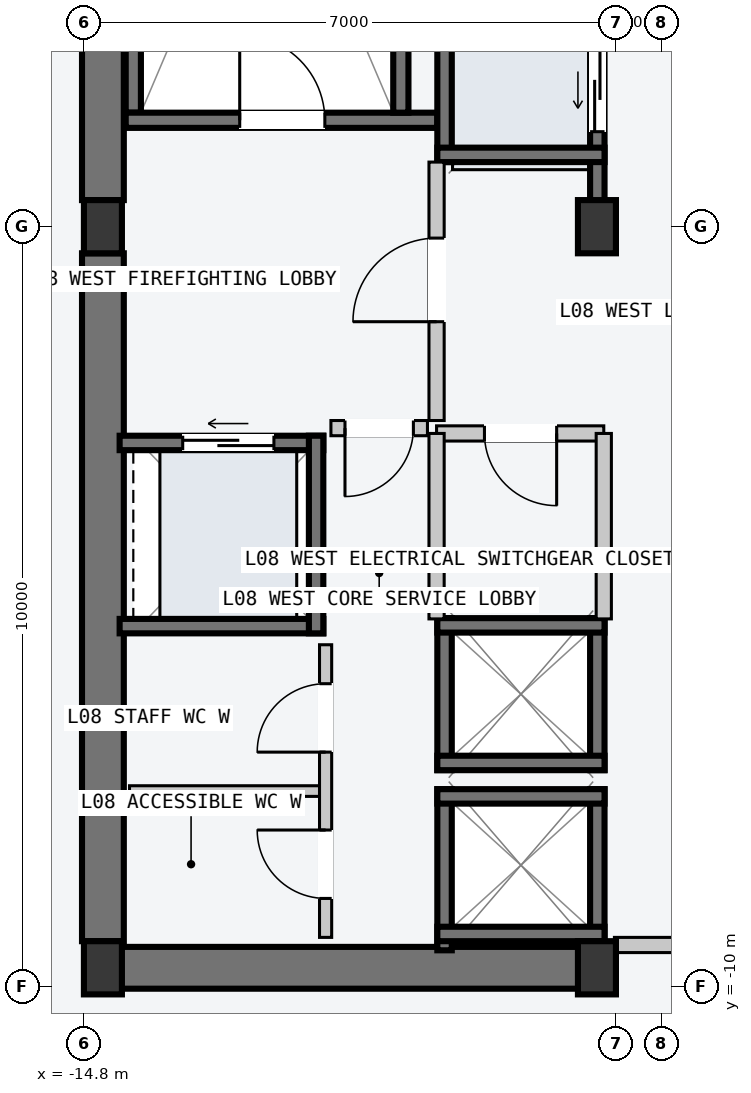
"""IFC4 building model, lengths in metres.
Left out: names, types, materials, properties, quantities, classifications, styles, units other than length and angle.
Written with IfcOpenShell. Run it as: python <this file> out.ifc"""

import sys

from ifc_helpers import new_model, si_unit, direction, frame, frame_2d, origin, origin_2d, place, context, subcontext, project, spatial, rectangle, i_section, extrude, element, fill, save


model = new_model("IFC4")
c1 = context("Model", 3, precision=1e-05, world=origin(), true_north=direction((0.0, 1.0)))
c2 = subcontext(c1, "Body", "Model", "MODEL_VIEW")
j1 = project(units=[si_unit("LENGTHUNIT", "METRE"), si_unit("PLANEANGLEUNIT", "RADIAN")], contexts=[c1])
p1 = place(None, origin())
s1 = spatial("IfcSite", under=j1, at=p1, CompositionType="ELEMENT")
p2 = place(p1, origin())
s2 = spatial("IfcBuilding", under=s1, at=p2, CompositionType="ELEMENT")
p3 = place(p2, frame((0.0, 0.0, 34.8)))
s3 = spatial("IfcBuildingStorey", under=s2, at=p3, CompositionType="ELEMENT", Elevation=34.8)
p4 = place(p3, frame((-14.53, -9.75, -0.2), z_axis=(0.0, 0.0, 1.0), x_axis=(1.0, 0.0, 0.0)))
e1 = element("IfcWall", 1, at=p4, inside=s3, PredefinedType="SHEAR", context=c2, shape_type="SweptSolid", body=[
    extrude(rectangle(XDim=6.46, YDim=0.55, at=frame_2d((3.23, 0.0))), origin(), (0.0, 0.0, 1.0), 3.6),
])
for number, where, z_axis, x_axis in (
    (2, (-14.55, -9.4, -0.2), (0.0, 0.0, 1.0), (0.0, 1.0, 0.0)),
    (3, (-14.55, 0.35, -0.2), (0.0, 0.0, 1.0), (0.0, 1.0, 0.0)),
):
    element("IfcWall", number, at=place(p3, frame(where, z_axis=z_axis, x_axis=x_axis)), inside=s3, PredefinedType="SHEAR", context=c2, shape_type="SweptSolid", body=[
        extrude(rectangle(XDim=9.05, YDim=0.55, at=frame_2d((4.525, 0.0))), origin(), (0.0, 0.0, 1.0), 3.6),
    ])
p5 = place(p3, frame((-14.15, 1.5, -0.2), z_axis=(0.0, 0.0, 1.0), x_axis=(0.0, 1.0, 0.0)))
e4 = element("IfcWall", 4, at=p5, inside=s3, PredefinedType="SOLIDWALL", context=c2, shape_type="SweptSolid", body=[
    extrude(rectangle(XDim=7.8, YDim=0.2, at=frame_2d((3.9, 0.0))), origin(), (0.0, 0.0, 1.0), 3.6),
])
p6 = place(p3, frame((-14.25, 1.4, -0.2), z_axis=(0.0, 0.0, 1.0), x_axis=(1.0, 0.0, 0.0)))
e5 = element("IfcWall", 5, at=p6, inside=s3, PredefinedType="SOLIDWALL", context=c2, shape_type="SweptSolid", body=[
    extrude(rectangle(XDim=4.1, YDim=0.2, at=frame_2d((2.05, 0.0))), origin(), (0.0, 0.0, 1.0), 3.6),
])
p7 = place(p6, frame((1.5, 0.0, 0.2)))
e6 = element("IfcOpeningElement", 6, at=p7, cuts=e5, PredefinedType="OPENING", context=c2, shape_type="SweptSolid", body=[
    extrude(rectangle(XDim=1.12, YDim=2.18, at=frame_2d((0.56, 1.09))), frame((0.0, 0.11, 0.0), z_axis=(0.0, -1.0, 0.0), x_axis=(1.0, 0.0, 0.0)), (0.0, 0.0, 1.0), 0.22),
])
p8 = place(p3, frame((-10.63, 1.5, -0.2), z_axis=(0.0, 0.0, 1.0), x_axis=(0.0, 1.0, 0.0)))
e7 = element("IfcWall", 7, at=p8, inside=s3, PredefinedType="SOLIDWALL", context=c2, shape_type="SweptSolid", body=[
    extrude(rectangle(XDim=7.8, YDim=0.2, at=frame_2d((3.9, 0.0))), origin(), (0.0, 0.0, 1.0), 3.6),
])
for number, where, z_axis, x_axis in (
    (8, (-14.55, -9.75, 0.0), (0.0, 0.0, 1.0), (1.0, 0.0, 0.0)),
    (9, (-14.55, 0.0, 0.0), (0.0, 0.0, 1.0), (1.0, 0.0, 0.0)),
    (10, (-8.05, -9.75, 0.0), (0.0, 0.0, 1.0), (1.0, 0.0, 0.0)),
    (11, (-8.05, 0.0, 0.0), (0.0, 0.0, 1.0), (1.0, 0.0, 0.0)),
):
    element("IfcColumn", number, at=place(p3, frame(where, z_axis=z_axis, x_axis=x_axis)), inside=s3, PredefinedType="COLUMN", context=c2, shape_type="SweptSolid", body=[
        extrude(i_section(OverallWidth=0.5, OverallDepth=0.7, WebThickness=0.028, FlangeThickness=0.045, at=origin_2d()), origin(), (0.0, 0.0, 1.0), 3.6),
    ])
p9 = place(p3, frame((-8.045, 0.21, -0.2), z_axis=(0.0, 0.0, 1.0), x_axis=(0.0, 1.0, 0.0)))
e12 = element("IfcWall", 12, at=p9, inside=s3, PredefinedType="SOLIDWALL", context=c2, shape_type="SweptSolid", body=[
    extrude(rectangle(XDim=2.54, YDim=0.19, at=frame_2d((1.27, 0.0))), origin(), (0.0, 0.0, 1.0), 3.6),
])
p10 = place(p9, frame((1.04, 0.0, 0.2)))
e13 = element("IfcOpeningElement", 13, at=p10, cuts=e12, PredefinedType="OPENING", context=c2, shape_type="SweptSolid", body=[
    extrude(rectangle(XDim=1.1, YDim=2.2, at=frame_2d((0.55, 1.1))), frame((0.0, 0.105, 0.0), z_axis=(0.0, -1.0, 0.0), x_axis=(1.0, 0.0, 0.0)), (0.0, 0.0, 1.0), 0.21),
])
p11 = place(p3, frame((-10.055, 0.85, -0.2), z_axis=(0.0, 0.0, 1.0), x_axis=(0.0, 1.0, 0.0)))
e14 = element("IfcWall", 14, at=p11, inside=s3, PredefinedType="SOLIDWALL", context=c2, shape_type="SweptSolid", body=[
    extrude(rectangle(XDim=1.9, YDim=0.19, at=frame_2d((0.95, 0.0))), origin(), (0.0, 0.0, 1.0), 3.6),
])
p12 = place(p3, frame((-10.15, 0.945, -0.2), z_axis=(0.0, 0.0, 1.0), x_axis=(1.0, 0.0, 0.0)))
e15 = element("IfcWall", 15, at=p12, inside=s3, PredefinedType="SOLIDWALL", context=c2, shape_type="SweptSolid", body=[
    extrude(rectangle(XDim=2.2, YDim=0.19, at=frame_2d((1.1, 0.0))), origin(), (0.0, 0.0, 1.0), 3.6),
])
for number, where, z_axis, x_axis in (
    (16, (-8.045, -9.52, -0.2), (0.0, 0.0, 1.0), (0.0, 1.0, 0.0)),
    (17, (-10.055, -9.52, -0.2), (0.0, 0.0, 1.0), (0.0, 1.0, 0.0)),
):
    element("IfcWall", number, at=place(p3, frame(where, z_axis=z_axis, x_axis=x_axis)), inside=s3, PredefinedType="SOLIDWALL", context=c2, shape_type="SweptSolid", body=[
        extrude(rectangle(XDim=2.12, YDim=0.19, at=frame_2d((1.06, 0.0))), origin(), (0.0, 0.0, 1.0), 3.6),
    ])
for number, where, z_axis, x_axis in (
    (18, (-10.15, -7.495, -0.2), (0.0, 0.0, 1.0), (1.0, 0.0, 0.0)),
    (19, (-10.15, -9.305, -0.2), (0.0, 0.0, 1.0), (1.0, 0.0, 0.0)),
):
    element("IfcWall", number, at=place(p3, frame(where, z_axis=z_axis, x_axis=x_axis)), inside=s3, PredefinedType="SOLIDWALL", context=c2, shape_type="SweptSolid", body=[
        extrude(rectangle(XDim=2.2, YDim=0.19, at=frame_2d((1.1, 0.0))), origin(), (0.0, 0.0, 1.0), 3.6),
    ])
for number, where, z_axis, x_axis in (
    (20, (-8.045, -7.15, -0.2), (0.0, 0.0, 1.0), (0.0, 1.0, 0.0)),
    (21, (-10.055, -7.15, -0.2), (0.0, 0.0, 1.0), (0.0, 1.0, 0.0)),
):
    element("IfcWall", number, at=place(p3, frame(where, z_axis=z_axis, x_axis=x_axis)), inside=s3, PredefinedType="SOLIDWALL", context=c2, shape_type="SweptSolid", body=[
        extrude(rectangle(XDim=2.0, YDim=0.19, at=frame_2d((1.0, 0.0))), origin(), (0.0, 0.0, 1.0), 3.6),
    ])
for number, where, z_axis, x_axis in (
    (22, (-10.15, -5.245, -0.2), (0.0, 0.0, 1.0), (1.0, 0.0, 0.0)),
    (23, (-10.15, -7.055, -0.2), (0.0, 0.0, 1.0), (1.0, 0.0, 0.0)),
):
    element("IfcWall", number, at=place(p3, frame(where, z_axis=z_axis, x_axis=x_axis)), inside=s3, PredefinedType="SOLIDWALL", context=c2, shape_type="SweptSolid", body=[
        extrude(rectangle(XDim=2.2, YDim=0.19, at=frame_2d((1.1, 0.0))), origin(), (0.0, 0.0, 1.0), 3.6),
    ])
p13 = place(p3, frame((-14.33, -2.845, -0.2), z_axis=(0.0, 0.0, 1.0), x_axis=(1.0, 0.0, 0.0)))
e24 = element("IfcWall", 24, at=p13, inside=s3, PredefinedType="SOLIDWALL", context=c2, shape_type="SweptSolid", body=[
    extrude(rectangle(XDim=2.68, YDim=0.19, at=frame_2d((1.34, 0.0))), origin(), (0.0, 0.0, 1.0), 3.6),
])
p14 = place(p13, frame((0.83, 0.0, 0.2)))
e25 = element("IfcOpeningElement", 25, at=p14, cuts=e24, PredefinedType="OPENING", context=c2, shape_type="SweptSolid", body=[
    extrude(rectangle(XDim=1.2, YDim=2.2, at=frame_2d((0.6, 1.1))), frame((0.0, 0.105, 0.0), z_axis=(0.0, -1.0, 0.0), x_axis=(1.0, 0.0, 0.0)), (0.0, 0.0, 1.0), 0.21),
])
p15 = place(p3, frame((-14.33, -5.255, -0.2), z_axis=(0.0, 0.0, 1.0), x_axis=(1.0, 0.0, 0.0)))
e26 = element("IfcWall", 26, at=p15, inside=s3, PredefinedType="SOLIDWALL", context=c2, shape_type="SweptSolid", body=[
    extrude(rectangle(XDim=2.68, YDim=0.19, at=frame_2d((1.34, 0.0))), origin(), (0.0, 0.0, 1.0), 3.6),
])
p16 = place(p3, frame((-11.745, -5.35, -0.2), z_axis=(0.0, 0.0, 1.0), x_axis=(0.0, 1.0, 0.0)))
e27 = element("IfcWall", 27, at=p16, inside=s3, PredefinedType="SOLIDWALL", context=c2, shape_type="SweptSolid", body=[
    extrude(rectangle(XDim=2.6, YDim=0.19, at=frame_2d((1.3, 0.0))), origin(), (0.0, 0.0, 1.0), 3.6),
])
p17 = place(p3, frame((-6.02, -9.45, 0.0), z_axis=(0.0, 0.0, 1.0), x_axis=(-1.0, 0.0, 0.0)))
e28 = element("IfcWall", 28, at=p17, inside=s3, PredefinedType="PARTITIONING", context=c2, shape_type="SweptSolid", body=[
    extrude(rectangle(XDim=1.8, YDim=0.2, at=frame_2d((0.9, 0.0))), origin(), (0.0, 0.0, 1.0), 3.4),
])
p18 = place(p3, frame((-10.16, -2.55, 0.0), z_axis=(0.0, 0.0, 1.0), x_axis=(0.0, 1.0, 0.0)))
e29 = element("IfcWall", 29, at=p18, inside=s3, PredefinedType="PARTITIONING", context=c2, shape_type="SweptSolid", body=[
    extrude(rectangle(XDim=3.4, YDim=0.2, at=frame_2d((1.7, 0.0))), origin(), (0.0, 0.0, 1.0), 3.4),
])
p19 = place(p18, frame((1.3, 0.0, 0.0)))
e30 = element("IfcOpeningElement", 30, at=p19, cuts=e29, PredefinedType="OPENING", context=c2, shape_type="SweptSolid", body=[
    extrude(rectangle(XDim=1.1, YDim=2.15, at=frame_2d((0.55, 1.075))), frame((0.0, 0.11, 0.0), z_axis=(0.0, -1.0, 0.0), x_axis=(1.0, 0.0, 0.0)), (0.0, 0.0, 1.0), 0.22),
])
p20 = place(p3, frame((-10.28, -2.65, 0.0), z_axis=(0.0, 0.0, 1.0), x_axis=(-1.0, 0.0, 0.0)))
e31 = element("IfcWall", 31, at=p20, inside=s3, PredefinedType="PARTITIONING", context=c2, shape_type="SweptSolid", body=[
    extrude(rectangle(XDim=1.27, YDim=0.2, at=frame_2d((0.635, 0.0))), origin(), (0.0, 0.0, 1.0), 3.4),
])
p21 = place(p20, frame((0.185, 0.0, 0.0)))
e32 = element("IfcOpeningElement", 32, at=p21, cuts=e31, PredefinedType="OPENING", context=c2, shape_type="SweptSolid", body=[
    extrude(rectangle(XDim=0.9, YDim=2.15, at=frame_2d((0.45, 1.075))), frame((0.0, 0.11, 0.0), z_axis=(0.0, -1.0, 0.0), x_axis=(1.0, 0.0, 0.0)), (0.0, 0.0, 1.0), 0.22),
])
p22 = place(p3, frame((-7.96, -2.72, 0.0), z_axis=(0.0, 0.0, 1.0), x_axis=(-1.0, 0.0, 0.0)))
e33 = element("IfcWall", 33, at=p22, inside=s3, PredefinedType="PARTITIONING", context=c2, shape_type="SweptSolid", body=[
    extrude(rectangle(XDim=2.2, YDim=0.2, at=frame_2d((1.1, 0.0))), origin(), (0.0, 0.0, 1.0), 3.4),
])
p23 = place(p22, frame((0.62, 0.0, 0.0)))
e34 = element("IfcOpeningElement", 34, at=p23, cuts=e33, PredefinedType="OPENING", context=c2, shape_type="SweptSolid", body=[
    extrude(rectangle(XDim=0.95, YDim=2.1, at=frame_2d((0.475, 1.05))), frame((0.0, 0.11, 0.0), z_axis=(0.0, -1.0, 0.0), x_axis=(1.0, 0.0, 0.0)), (0.0, 0.0, 1.0), 0.22),
])
for number, where, z_axis, x_axis in (
    (35, (-7.96, -5.16, 0.0), (0.0, 0.0, 1.0), (0.0, 1.0, 0.0)),
    (36, (-10.16, -5.16, 0.0), (0.0, 0.0, 1.0), (0.0, 1.0, 0.0)),
):
    element("IfcWall", number, at=place(p3, frame(where, z_axis=z_axis, x_axis=x_axis)), inside=s3, PredefinedType="PARTITIONING", context=c2, shape_type="SweptSolid", body=[
        extrude(rectangle(XDim=2.44, YDim=0.2, at=frame_2d((1.22, 0.0))), origin(), (0.0, 0.0, 1.0), 3.4),
    ])
p24 = place(p3, frame((-11.7, -7.425, 0.0), z_axis=(0.0, 0.0, 1.0), x_axis=(-1.0, 0.0, 0.0)))
e37 = element("IfcWall", 37, at=p24, inside=s3, PredefinedType="PARTITIONING", context=c2, shape_type="SweptSolid", body=[
    extrude(rectangle(XDim=2.5, YDim=0.14, at=frame_2d((1.25, 0.0))), origin(), (0.0, 0.0, 1.0), 3.4),
])
p25 = place(p3, frame((-11.62, -9.35, 0.0), z_axis=(0.0, 0.0, 1.0), x_axis=(0.0, 1.0, 0.0)))
e38 = element("IfcWall", 38, at=p25, inside=s3, PredefinedType="PARTITIONING", context=c2, shape_type="SweptSolid", body=[
    extrude(rectangle(XDim=3.85, YDim=0.16, at=frame_2d((1.925, 0.0))), origin(), (0.0, 0.0, 1.0), 3.4),
])
p26 = place(p25, frame((0.512, 0.0, 0.0)))
e39 = element("IfcOpeningElement", 39, at=p26, cuts=e38, PredefinedType="OPENING", context=c2, shape_type="SweptSolid", body=[
    extrude(rectangle(XDim=0.9, YDim=2.15, at=frame_2d((0.45, 1.075))), frame((0.0, 0.09, 0.0), z_axis=(0.0, -1.0, 0.0), x_axis=(1.0, 0.0, 0.0)), (0.0, 0.0, 1.0), 0.18),
])
p27 = place(p25, frame((2.438, 0.0, 0.0)))
e40 = element("IfcOpeningElement", 40, at=p27, cuts=e38, PredefinedType="OPENING", context=c2, shape_type="SweptSolid", body=[
    extrude(rectangle(XDim=0.9, YDim=2.15, at=frame_2d((0.45, 1.075))), frame((0.0, 0.09, 0.0), z_axis=(0.0, -1.0, 0.0), x_axis=(1.0, 0.0, 0.0)), (0.0, 0.0, 1.0), 0.18),
])
p28 = place(p7, origin())
e41 = element("IfcDoor", 41, at=p28, inside=s3, OperationType="SINGLE_SWING_LEFT", PredefinedType="DOOR", context=c2, shape_type="SweptSolid", body=[
    extrude(rectangle(XDim=1.12, YDim=2.18, at=frame_2d((0.56, 1.09))), frame((0.0, 0.025, 0.0), z_axis=(0.0, -1.0, 0.0), x_axis=(1.0, 0.0, 0.0)), (0.0, 0.0, 1.0), 0.05),
])
fill(e6, e41)
p29 = place(p10, origin())
e42 = element("IfcDoor", 42, at=p29, inside=s3, OperationType="SLIDING_TO_LEFT", PredefinedType="DOOR", context=c2, shape_type="SweptSolid", body=[
    extrude(rectangle(XDim=1.1, YDim=2.2, at=frame_2d((0.55, 1.1))), frame((0.0, 0.025, 0.0), z_axis=(0.0, -1.0, 0.0), x_axis=(1.0, 0.0, 0.0)), (0.0, 0.0, 1.0), 0.05),
])
fill(e13, e42)
p30 = place(p14, origin())
e43 = element("IfcDoor", 43, at=p30, inside=s3, OperationType="SLIDING_TO_LEFT", PredefinedType="DOOR", context=c2, shape_type="SweptSolid", body=[
    extrude(rectangle(XDim=1.2, YDim=2.2, at=frame_2d((0.6, 1.1))), frame((0.0, 0.025, 0.0), z_axis=(0.0, -1.0, 0.0), x_axis=(1.0, 0.0, 0.0)), (0.0, 0.0, 1.0), 0.05),
])
fill(e25, e43)
p31 = place(p19, origin())
e44 = element("IfcDoor", 44, at=p31, inside=s3, OperationType="SINGLE_SWING_LEFT", PredefinedType="DOOR", context=c2, shape_type="SweptSolid", body=[
    extrude(rectangle(XDim=1.1, YDim=2.15, at=frame_2d((0.55, 1.075))), frame((0.0, 0.025, 0.0), z_axis=(0.0, -1.0, 0.0), x_axis=(1.0, 0.0, 0.0)), (0.0, 0.0, 1.0), 0.05),
])
fill(e30, e44)
p32 = place(p21, origin())
e45 = element("IfcDoor", 45, at=p32, inside=s3, OperationType="SINGLE_SWING_RIGHT", PredefinedType="DOOR", context=c2, shape_type="SweptSolid", body=[
    extrude(rectangle(XDim=0.9, YDim=2.15, at=frame_2d((0.45, 1.075))), frame((0.0, 0.025, 0.0), z_axis=(0.0, -1.0, 0.0), x_axis=(1.0, 0.0, 0.0)), (0.0, 0.0, 1.0), 0.05),
])
fill(e32, e45)
p33 = place(p23, origin())
e46 = element("IfcDoor", 46, at=p33, inside=s3, OperationType="SINGLE_SWING_LEFT", PredefinedType="DOOR", context=c2, shape_type="SweptSolid", body=[
    extrude(rectangle(XDim=0.95, YDim=2.1, at=frame_2d((0.475, 1.05))), frame((0.0, 0.025, 0.0), z_axis=(0.0, -1.0, 0.0), x_axis=(1.0, 0.0, 0.0)), (0.0, 0.0, 1.0), 0.05),
])
fill(e34, e46)
p34 = place(p26, origin())
e47 = element("IfcDoor", 47, at=p34, inside=s3, OperationType="SINGLE_SWING_RIGHT", PredefinedType="DOOR", context=c2, shape_type="SweptSolid", body=[
    extrude(rectangle(XDim=0.9, YDim=2.15, at=frame_2d((0.45, 1.075))), frame((0.0, 0.025, 0.0), z_axis=(0.0, -1.0, 0.0), x_axis=(1.0, 0.0, 0.0)), (0.0, 0.0, 1.0), 0.05),
])
fill(e39, e47)
p35 = place(p27, origin())
e48 = element("IfcDoor", 48, at=p35, inside=s3, OperationType="SINGLE_SWING_LEFT", PredefinedType="DOOR", context=c2, shape_type="SweptSolid", body=[
    extrude(rectangle(XDim=0.9, YDim=2.15, at=frame_2d((0.45, 1.075))), frame((0.0, 0.025, 0.0), z_axis=(0.0, -1.0, 0.0), x_axis=(1.0, 0.0, 0.0)), (0.0, 0.0, 1.0), 0.05),
])
fill(e40, e48)
save(model, sys.argv[1])
